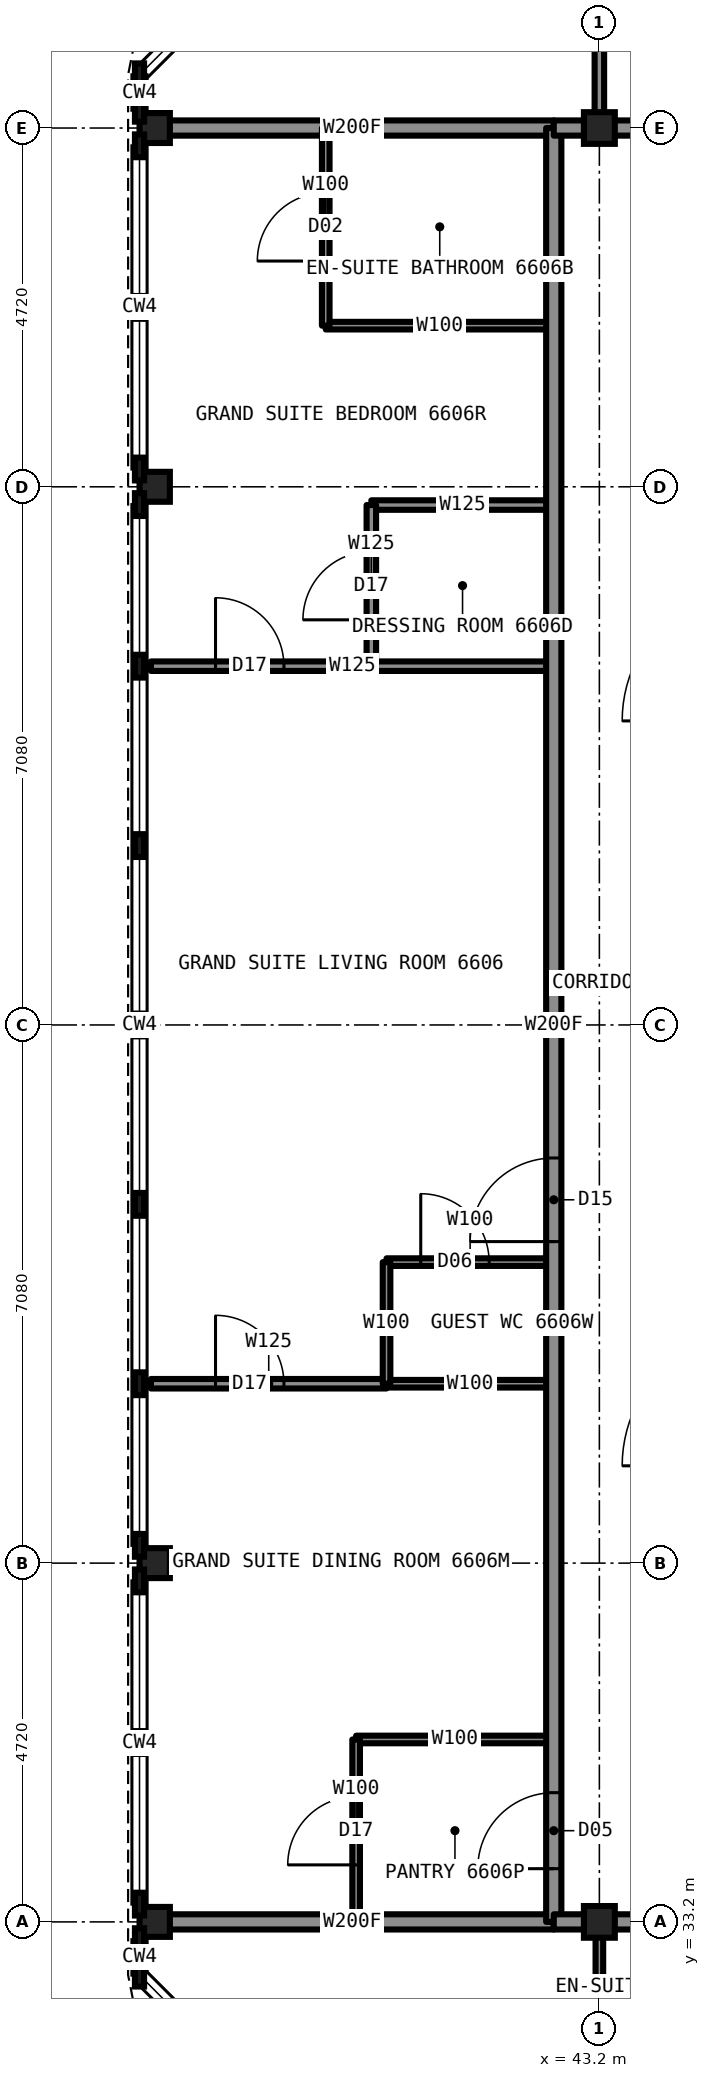
"""IFC4 building model, lengths in metres.
Left out: names, types, materials, properties, quantities, classifications, styles, units other than length and angle.
Written with IfcOpenShell. Run it as: python <this file> out.ifc"""

import sys

from ifc_helpers import new_model, si_unit, direction, frame, frame_2d, origin, origin_2d, place, context, subcontext, project, spatial, rectangle, i_section, extrude, element, fill, save


model = new_model("IFC4")
c1 = context("Model", 3, precision=1e-05, world=origin(), true_north=direction((0.0, 1.0)))
c2 = subcontext(c1, "Body", "Model", "MODEL_VIEW")
j1 = project(units=[si_unit("LENGTHUNIT", "METRE"), si_unit("PLANEANGLEUNIT", "RADIAN")], contexts=[c1])
p1 = place(None, origin())
s1 = spatial("IfcSite", under=j1, at=p1, CompositionType="ELEMENT")
p2 = place(p1, origin())
s2 = spatial("IfcBuilding", under=s1, at=p2, CompositionType="ELEMENT")
p3 = place(p2, frame((0.0, 0.0, 237.2)))
s3 = spatial("IfcBuildingStorey", under=s2, at=p3, CompositionType="ELEMENT", Elevation=237.2)
for number, where, z_axis, x_axis in (
    (1, (37.35, 33.2, 0.0), (0.0, 0.0, 1.0), (1.0, 0.0, 0.0)),
    (2, (37.35, 37.92, 0.0), (0.0, 0.0, 1.0), (1.0, 0.0, 0.0)),
    (3, (37.35, 52.08, 0.0), (0.0, 0.0, 1.0), (1.0, 0.0, 0.0)),
    (4, (37.35, 56.8, 0.0), (0.0, 0.0, 1.0), (1.0, 0.0, 0.0)),
):
    element("IfcColumn", number, at=place(p3, frame(where, z_axis=z_axis, x_axis=x_axis)), inside=s3, PredefinedType="COLUMN", context=c2, shape_type="SweptSolid", body=[
        extrude(i_section(OverallWidth=0.399, OverallDepth=0.394, WebThickness=0.023, FlangeThickness=0.037, at=origin_2d()), origin(), (0.0, 0.0, 1.0), 3.5),
    ])
for number, where, z_axis, x_axis in (
    (5, (43.2, 33.2, 0.0), (0.0, 0.0, 1.0), (1.0, 0.0, 0.0)),
    (6, (43.2, 56.8, 0.0), (0.0, 0.0, 1.0), (1.0, 0.0, 0.0)),
):
    element("IfcColumn", number, at=place(p3, frame(where, z_axis=z_axis, x_axis=x_axis)), inside=s3, PredefinedType="COLUMN", context=c2, shape_type="SweptSolid", body=[
        extrude(i_section(OverallWidth=0.406, OverallDepth=0.417, WebThickness=0.03, FlangeThickness=0.048, at=origin_2d()), origin(), (0.0, 0.0, 1.0), 3.5),
    ])
p4 = place(p3, frame((43.22, 33.2, 0.0), z_axis=(0.0, 0.0, 1.0), x_axis=(1.0, 0.0, 0.0)))
e7 = element("IfcWall", 7, at=p4, inside=s3, PredefinedType="PARTITIONING", context=c2, shape_type="SweptSolid", body=[
    extrude(rectangle(XDim=1.78, YDim=0.2, at=frame_2d((0.89, 0.0))), origin(), (0.0, 0.0, 1.0), 3.33),
])
p5 = place(p3, frame((37.3, 33.2, 0.0), z_axis=(0.0, 0.0, 1.0), x_axis=(1.0, 0.0, 0.0)))
e8 = element("IfcWall", 8, at=p5, inside=s3, PredefinedType="PARTITIONING", context=c2, shape_type="SweptSolid", body=[
    extrude(rectangle(XDim=5.3, YDim=0.2, at=frame_2d((2.65, 0.0))), origin(), (0.0, 0.0, 1.0), 2.573),
])
p6 = place(p3, frame((40.4, 41.88, 0.0), z_axis=(0.0, 0.0, 1.0), x_axis=(1.0, 0.0, 0.0)))
e9 = element("IfcWall", 9, at=p6, inside=s3, PredefinedType="PARTITIONING", context=c2, shape_type="SweptSolid", body=[
    extrude(rectangle(XDim=2.2, YDim=0.1, at=frame_2d((1.1, 0.0))), origin(), (0.0, 0.0, 1.0), 3.33),
])
p7 = place(p6, frame((0.45, 0.0, 0.0)))
e10 = element("IfcOpeningElement", 10, at=p7, cuts=e9, PredefinedType="OPENING", context=c2, shape_type="SweptSolid", body=[
    extrude(rectangle(XDim=0.9, YDim=2.1, at=frame_2d((0.45, 1.05))), frame((0.0, 0.06, 0.0), z_axis=(0.0, -1.0, 0.0), x_axis=(1.0, 0.0, 0.0)), (0.0, 0.0, 1.0), 0.12),
])
p8 = place(p3, frame((40.4, 40.28, 0.0), z_axis=(0.0, 0.0, 1.0), x_axis=(1.0, 0.0, 0.0)))
e11 = element("IfcWall", 11, at=p8, inside=s3, PredefinedType="PARTITIONING", context=c2, shape_type="SweptSolid", body=[
    extrude(rectangle(XDim=2.2, YDim=0.1, at=frame_2d((1.1, 0.0))), origin(), (0.0, 0.0, 1.0), 2.797),
])
p9 = place(p3, frame((37.3, 40.28, 0.0), z_axis=(0.0, 0.0, 1.0), x_axis=(1.0, 0.0, 0.0)))
e12 = element("IfcWall", 12, at=p9, inside=s3, PredefinedType="PARTITIONING", context=c2, shape_type="SweptSolid", body=[
    extrude(rectangle(XDim=3.1, YDim=0.125, at=frame_2d((1.55, 0.0))), origin(), (0.0, 0.0, 1.0), 2.797),
])
p10 = place(p9, frame((0.85, 0.0, 0.0)))
e13 = element("IfcOpeningElement", 13, at=p10, cuts=e12, PredefinedType="OPENING", context=c2, shape_type="SweptSolid", body=[
    extrude(rectangle(XDim=0.9, YDim=2.2, at=frame_2d((0.45, 1.1))), frame((0.0, 0.073, 0.0), z_axis=(0.0, -1.0, 0.0), x_axis=(1.0, 0.0, 0.0)), (0.0, 0.0, 1.0), 0.145),
])
p11 = place(p3, frame((40.0, 35.6, 0.0), z_axis=(0.0, 0.0, 1.0), x_axis=(1.0, 0.0, 0.0)))
e14 = element("IfcWall", 14, at=p11, inside=s3, PredefinedType="PARTITIONING", context=c2, shape_type="SweptSolid", body=[
    extrude(rectangle(XDim=2.6, YDim=0.1, at=frame_2d((1.3, 0.0))), origin(), (0.0, 0.0, 1.0), 2.797),
])
p12 = place(p3, frame((43.22, 56.8, 0.0), z_axis=(0.0, 0.0, 1.0), x_axis=(1.0, 0.0, 0.0)))
e15 = element("IfcWall", 15, at=p12, inside=s3, PredefinedType="PARTITIONING", context=c2, shape_type="SweptSolid", body=[
    extrude(rectangle(XDim=1.78, YDim=0.2, at=frame_2d((0.89, 0.0))), origin(), (0.0, 0.0, 1.0), 3.33),
])
p13 = place(p3, frame((37.3, 56.8, 0.0), z_axis=(0.0, 0.0, 1.0), x_axis=(1.0, 0.0, 0.0)))
e16 = element("IfcWall", 16, at=p13, inside=s3, PredefinedType="PARTITIONING", context=c2, shape_type="SweptSolid", body=[
    extrude(rectangle(XDim=5.3, YDim=0.2, at=frame_2d((2.65, 0.0))), origin(), (0.0, 0.0, 1.0), 2.573),
])
p14 = place(p3, frame((37.3, 49.72, 0.0), z_axis=(0.0, 0.0, 1.0), x_axis=(1.0, 0.0, 0.0)))
e17 = element("IfcWall", 17, at=p14, inside=s3, PredefinedType="PARTITIONING", context=c2, shape_type="SweptSolid", body=[
    extrude(rectangle(XDim=5.3, YDim=0.125, at=frame_2d((2.65, 0.0))), origin(), (0.0, 0.0, 1.0), 2.797),
])
p15 = place(p14, frame((0.85, 0.0, 0.0)))
e18 = element("IfcOpeningElement", 18, at=p15, cuts=e17, PredefinedType="OPENING", context=c2, shape_type="SweptSolid", body=[
    extrude(rectangle(XDim=0.9, YDim=2.2, at=frame_2d((0.45, 1.1))), frame((0.0, 0.073, 0.0), z_axis=(0.0, -1.0, 0.0), x_axis=(1.0, 0.0, 0.0)), (0.0, 0.0, 1.0), 0.145),
])
p16 = place(p3, frame((40.2, 51.84, 0.0), z_axis=(0.0, 0.0, 1.0), x_axis=(1.0, 0.0, 0.0)))
e19 = element("IfcWall", 19, at=p16, inside=s3, PredefinedType="PARTITIONING", context=c2, shape_type="SweptSolid", body=[
    extrude(rectangle(XDim=2.4, YDim=0.125, at=frame_2d((1.2, 0.0))), origin(), (0.0, 0.0, 1.0), 3.33),
])
p17 = place(p3, frame((39.6, 54.2, 0.0), z_axis=(0.0, 0.0, 1.0), x_axis=(1.0, 0.0, 0.0)))
e20 = element("IfcWall", 20, at=p17, inside=s3, PredefinedType="PARTITIONING", context=c2, shape_type="SweptSolid", body=[
    extrude(rectangle(XDim=3.0, YDim=0.1, at=frame_2d((1.5, 0.0))), origin(), (0.0, 0.0, 1.0), 3.33),
])
p18 = place(p3, frame((43.2, 30.4, 0.0), z_axis=(0.0, 0.0, 1.0), x_axis=(0.0, 1.0, 0.0)))
e21 = element("IfcWall", 21, at=p18, inside=s3, PredefinedType="PARTITIONING", context=c2, shape_type="SweptSolid", body=[
    extrude(rectangle(XDim=2.8, YDim=0.1, at=frame_2d((1.4, 0.0))), origin(), (0.0, 0.0, 1.0), 2.573),
])
p19 = place(p3, frame((43.2, 56.8, 0.0), z_axis=(0.0, 0.0, 1.0), x_axis=(0.0, 1.0, 0.0)))
e22 = element("IfcWall", 22, at=p19, inside=s3, PredefinedType="PARTITIONING", context=c2, shape_type="SweptSolid", body=[
    extrude(rectangle(XDim=5.9, YDim=0.125, at=frame_2d((2.95, 0.0))), origin(), (0.0, 0.0, 1.0), 2.573),
])
p20 = place(p19, frame((3.55, 0.0, 0.0)))
e23 = element("IfcOpeningElement", 23, at=p20, cuts=e22, PredefinedType="OPENING", context=c2, shape_type="SweptSolid", body=[
    extrude(rectangle(XDim=0.9, YDim=2.2, at=frame_2d((0.45, 1.1))), frame((0.0, 0.073, 0.0), z_axis=(0.0, -1.0, 0.0), x_axis=(1.0, 0.0, 0.0)), (0.0, 0.0, 1.0), 0.145),
])
p21 = place(p3, frame((42.6, 33.2, 0.0), z_axis=(0.0, 0.0, 1.0), x_axis=(0.0, 1.0, 0.0)))
e24 = element("IfcWall", 24, at=p21, inside=s3, PredefinedType="PARTITIONING", context=c2, shape_type="SweptSolid", body=[
    extrude(rectangle(XDim=23.6, YDim=0.2, at=frame_2d((11.8, 0.0))), origin(), (0.0, 0.0, 1.0), 3.33),
])
p22 = place(p21, frame((8.95, 0.0, 0.0)))
e25 = element("IfcOpeningElement", 25, at=p22, cuts=e24, PredefinedType="OPENING", context=c2, shape_type="SweptSolid", body=[
    extrude(rectangle(XDim=1.1, YDim=2.2, at=frame_2d((0.55, 1.1))), frame((0.0, 0.11, 0.0), z_axis=(0.0, -1.0, 0.0), x_axis=(1.0, 0.0, 0.0)), (0.0, 0.0, 1.0), 0.22),
])
p23 = place(p21, frame((0.7, 0.0, 0.0)))
e26 = element("IfcOpeningElement", 26, at=p23, cuts=e24, PredefinedType="OPENING", context=c2, shape_type="SweptSolid", body=[
    extrude(rectangle(XDim=1.0, YDim=2.1, at=frame_2d((0.5, 1.05))), frame((0.0, 0.11, 0.0), z_axis=(0.0, -1.0, 0.0), x_axis=(1.0, 0.0, 0.0)), (0.0, 0.0, 1.0), 0.22),
])
p24 = place(p3, frame((40.4, 40.28, 0.0), z_axis=(0.0, 0.0, 1.0), x_axis=(0.0, 1.0, 0.0)))
e27 = element("IfcWall", 27, at=p24, inside=s3, PredefinedType="PARTITIONING", context=c2, shape_type="SweptSolid", body=[
    extrude(rectangle(XDim=1.6, YDim=0.1, at=frame_2d((0.8, 0.0))), origin(), (0.0, 0.0, 1.0), 3.33),
])
p25 = place(p3, frame((40.2, 49.72, 0.0), z_axis=(0.0, 0.0, 1.0), x_axis=(0.0, 1.0, 0.0)))
e28 = element("IfcWall", 28, at=p25, inside=s3, PredefinedType="PARTITIONING", context=c2, shape_type="SweptSolid", body=[
    extrude(rectangle(XDim=2.12, YDim=0.125, at=frame_2d((1.06, 0.0))), origin(), (0.0, 0.0, 1.0), 3.33),
])
p26 = place(p25, frame((0.61, 0.0, 0.0)))
e29 = element("IfcOpeningElement", 29, at=p26, cuts=e28, PredefinedType="OPENING", context=c2, shape_type="SweptSolid", body=[
    extrude(rectangle(XDim=0.9, YDim=2.2, at=frame_2d((0.45, 1.1))), frame((0.0, 0.073, 0.0), z_axis=(0.0, -1.0, 0.0), x_axis=(1.0, 0.0, 0.0)), (0.0, 0.0, 1.0), 0.145),
])
p27 = place(p3, frame((40.0, 33.2, 0.0), z_axis=(0.0, 0.0, 1.0), x_axis=(0.0, 1.0, 0.0)))
e30 = element("IfcWall", 30, at=p27, inside=s3, PredefinedType="PARTITIONING", context=c2, shape_type="SweptSolid", body=[
    extrude(rectangle(XDim=2.4, YDim=0.1, at=frame_2d((1.2, 0.0))), origin(), (0.0, 0.0, 1.0), 3.33),
])
p28 = place(p27, frame((0.75, 0.0, 0.0)))
e31 = element("IfcOpeningElement", 31, at=p28, cuts=e30, PredefinedType="OPENING", context=c2, shape_type="SweptSolid", body=[
    extrude(rectangle(XDim=0.9, YDim=2.2, at=frame_2d((0.45, 1.1))), frame((0.0, 0.06, 0.0), z_axis=(0.0, -1.0, 0.0), x_axis=(1.0, 0.0, 0.0)), (0.0, 0.0, 1.0), 0.12),
])
p29 = place(p3, frame((39.6, 54.2, 0.0), z_axis=(0.0, 0.0, 1.0), x_axis=(0.0, 1.0, 0.0)))
e32 = element("IfcWall", 32, at=p29, inside=s3, PredefinedType="PARTITIONING", context=c2, shape_type="SweptSolid", body=[
    extrude(rectangle(XDim=2.6, YDim=0.1, at=frame_2d((1.3, 0.0))), origin(), (0.0, 0.0, 1.0), 3.33),
])
p30 = place(p29, frame((0.85, 0.0, 0.0)))
e33 = element("IfcOpeningElement", 33, at=p30, cuts=e32, PredefinedType="OPENING", context=c2, shape_type="SweptSolid", body=[
    extrude(rectangle(XDim=0.9, YDim=2.1, at=frame_2d((0.45, 1.05))), frame((0.0, 0.06, 0.0), z_axis=(0.0, -1.0, 0.0), x_axis=(1.0, 0.0, 0.0)), (0.0, 0.0, 1.0), 0.12),
])
for number, where, z_axis, x_axis in (
    (34, (42.6, 33.2, 0.0), (0.0, 0.0, 1.0), (1.0, 0.0, 0.0)),
    (35, (42.6, 56.8, 0.0), (0.0, 0.0, 1.0), (1.0, 0.0, 0.0)),
):
    element("IfcWall", number, at=place(p3, frame(where, z_axis=z_axis, x_axis=x_axis)), inside=s3, PredefinedType="PARTITIONING", context=c2, shape_type="SweptSolid", body=[
        extrude(rectangle(XDim=0.62, YDim=0.2, at=frame_2d((0.31, 0.0))), origin(), (0.0, 0.0, 1.0), 2.573),
    ])
p31 = place(p22, origin())
e36 = element("IfcDoor", 36, at=p31, inside=s3, OperationType="SINGLE_SWING_LEFT", PredefinedType="DOOR", context=c2, shape_type="SweptSolid", body=[
    extrude(rectangle(XDim=1.1, YDim=2.2, at=frame_2d((0.55, 1.1))), frame((0.0, 0.025, 0.0), z_axis=(0.0, -1.0, 0.0), x_axis=(1.0, 0.0, 0.0)), (0.0, 0.0, 1.0), 0.05),
])
fill(e25, e36)
p32 = place(p30, origin())
e37 = element("IfcDoor", 37, at=p32, inside=s3, OperationType="SINGLE_SWING_RIGHT", PredefinedType="DOOR", context=c2, shape_type="SweptSolid", body=[
    extrude(rectangle(XDim=0.9, YDim=2.1, at=frame_2d((0.45, 1.05))), frame((0.0, 0.025, 0.0), z_axis=(0.0, -1.0, 0.0), x_axis=(1.0, 0.0, 0.0)), (0.0, 0.0, 1.0), 0.05),
])
fill(e33, e37)
p33 = place(p26, origin())
e38 = element("IfcDoor", 38, at=p33, inside=s3, OperationType="SINGLE_SWING_LEFT", PredefinedType="DOOR", context=c2, shape_type="SweptSolid", body=[
    extrude(rectangle(XDim=0.9, YDim=2.2, at=frame_2d((0.45, 1.1))), frame((0.0, 0.025, 0.0), z_axis=(0.0, -1.0, 0.0), x_axis=(1.0, 0.0, 0.0)), (0.0, 0.0, 1.0), 0.05),
])
fill(e29, e38)
p34 = place(p10, origin())
e39 = element("IfcDoor", 39, at=p34, inside=s3, OperationType="SINGLE_SWING_LEFT", PredefinedType="DOOR", context=c2, shape_type="SweptSolid", body=[
    extrude(rectangle(XDim=0.9, YDim=2.2, at=frame_2d((0.45, 1.1))), frame((0.0, 0.025, 0.0), z_axis=(0.0, -1.0, 0.0), x_axis=(1.0, 0.0, 0.0)), (0.0, 0.0, 1.0), 0.05),
])
fill(e13, e39)
p35 = place(p28, origin())
e40 = element("IfcDoor", 40, at=p35, inside=s3, OperationType="SINGLE_SWING_LEFT", PredefinedType="DOOR", context=c2, shape_type="SweptSolid", body=[
    extrude(rectangle(XDim=0.9, YDim=2.2, at=frame_2d((0.45, 1.1))), frame((0.0, 0.025, 0.0), z_axis=(0.0, -1.0, 0.0), x_axis=(1.0, 0.0, 0.0)), (0.0, 0.0, 1.0), 0.05),
])
fill(e31, e40)
p36 = place(p23, origin())
e41 = element("IfcDoor", 41, at=p36, inside=s3, OperationType="SINGLE_SWING_LEFT", PredefinedType="DOOR", context=c2, shape_type="SweptSolid", body=[
    extrude(rectangle(XDim=1.0, YDim=2.1, at=frame_2d((0.5, 1.05))), frame((0.0, 0.025, 0.0), z_axis=(0.0, -1.0, 0.0), x_axis=(1.0, 0.0, 0.0)), (0.0, 0.0, 1.0), 0.05),
])
fill(e26, e41)
p37 = place(p15, origin())
e42 = element("IfcDoor", 42, at=p37, inside=s3, OperationType="SINGLE_SWING_LEFT", PredefinedType="DOOR", context=c2, shape_type="SweptSolid", body=[
    extrude(rectangle(XDim=0.9, YDim=2.2, at=frame_2d((0.45, 1.1))), frame((0.0, 0.025, 0.0), z_axis=(0.0, -1.0, 0.0), x_axis=(1.0, 0.0, 0.0)), (0.0, 0.0, 1.0), 0.05),
])
fill(e18, e42)
p38 = place(p7, origin())
e43 = element("IfcDoor", 43, at=p38, inside=s3, OperationType="SINGLE_SWING_LEFT", PredefinedType="DOOR", context=c2, shape_type="SweptSolid", body=[
    extrude(rectangle(XDim=0.9, YDim=2.1, at=frame_2d((0.45, 1.05))), frame((0.0, 0.025, 0.0), z_axis=(0.0, -1.0, 0.0), x_axis=(1.0, 0.0, 0.0)), (0.0, 0.0, 1.0), 0.05),
])
fill(e10, e43)
save(model, sys.argv[1])
